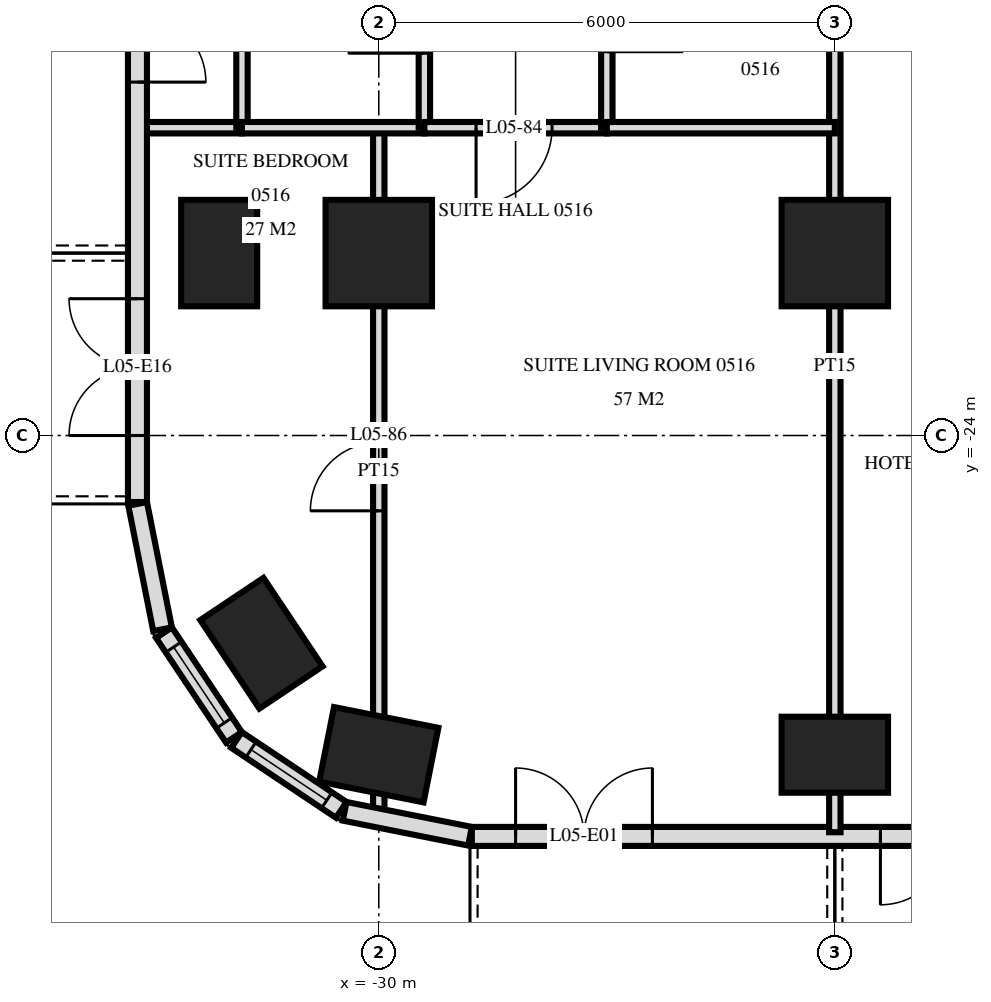
"""IFC4 building model, lengths in metres.
Left out: names, types, materials, properties, quantities, classifications, styles, units other than length and angle.
Written with IfcOpenShell. Run it as: python <this file> out.ifc"""

import sys

from ifc_helpers import new_model, si_unit, direction, frame, frame_2d, origin, origin_2d, place, context, subcontext, project, spatial, rectangle, extrude, element, fill, save


model = new_model("IFC4")
c1 = context("Model", 3, precision=1e-05, world=origin(), true_north=direction((0.0, 1.0)))
c2 = subcontext(c1, "Body", "Model", "MODEL_VIEW")
j1 = project(units=[si_unit("LENGTHUNIT", "METRE"), si_unit("PLANEANGLEUNIT", "RADIAN")], contexts=[c1])
p1 = place(None, origin())
s1 = spatial("IfcSite", under=j1, at=p1, CompositionType="ELEMENT")
p2 = place(p1, origin())
s2 = spatial("IfcBuilding", under=s1, at=p2, CompositionType="ELEMENT")
p3 = place(p2, frame((0.0, 0.0, 27.6)))
s3 = spatial("IfcBuildingStorey", under=s2, at=p3, CompositionType="ELEMENT", Elevation=27.6)
for number, where, z_axis, x_axis in (
    (1, (-32.1, -21.6, 0.0), (0.0, 0.0, 1.0), (0.0, 1.0, 0.0)),
    (2, (-31.544, -26.733, 0.0), (0.0, 0.0, 1.0), (-0.556, 0.831, 0.0)),
    (3, (-30.0, -28.2, 0.0), (0.0, 0.0, 1.0), (-0.981, 0.195, 0.0)),
):
    element("IfcColumn", number, at=place(p3, frame(where, z_axis=z_axis, x_axis=x_axis)), inside=s3, PredefinedType="COLUMN", context=c2, shape_type="SweptSolid", body=[
        extrude(rectangle(XDim=1.4, YDim=1.0, at=origin_2d()), origin(), (0.0, 0.0, 1.0), 3.6),
    ])
p4 = place(p3, frame((-30.0, -21.6, 0.0), z_axis=(0.0, 0.0, 1.0), x_axis=(1.0, 0.0, 0.0)))
e4 = element("IfcColumn", 4, at=p4, inside=s3, PredefinedType="COLUMN", context=c2, shape_type="SweptSolid", body=[
    extrude(rectangle(XDim=1.4, YDim=1.4, at=origin_2d()), origin(), (0.0, 0.0, 1.0), 3.6),
])
p5 = place(p3, frame((-24.0, -28.2, 0.0), z_axis=(0.0, 0.0, 1.0), x_axis=(1.0, 0.0, 0.0)))
e5 = element("IfcColumn", 5, at=p5, inside=s3, PredefinedType="COLUMN", context=c2, shape_type="SweptSolid", body=[
    extrude(rectangle(XDim=1.4, YDim=1.0, at=origin_2d()), origin(), (0.0, 0.0, 1.0), 3.6),
])
p6 = place(p3, frame((-24.0, -21.6, 0.0), z_axis=(0.0, 0.0, 1.0), x_axis=(1.0, 0.0, 0.0)))
e6 = element("IfcColumn", 6, at=p6, inside=s3, PredefinedType="COLUMN", context=c2, shape_type="SweptSolid", body=[
    extrude(rectangle(XDim=1.4, YDim=1.4, at=origin_2d()), origin(), (0.0, 0.0, 1.0), 3.6),
])
p7 = place(p3, frame((-33.175, -3.325, 0.0), z_axis=(0.0, 0.0, 1.0), x_axis=(0.0, -1.0, 0.0)))
e7 = element("IfcWall", 7, at=p7, inside=s3, PredefinedType="SOLIDWALL", context=c2, shape_type="SweptSolid", body=[
    extrude(rectangle(XDim=21.551, YDim=0.25, at=frame_2d((10.775, 0.0))), origin(), (0.0, 0.0, 1.0), 3.32),
])
p8 = place(p7, frame((7.025, 0.0, 0.0)))
e8 = element("IfcOpeningElement", 8, at=p8, cuts=e7, PredefinedType="OPENING", context=c2, shape_type="SweptSolid", body=[
    extrude(rectangle(XDim=1.8, YDim=2.4, at=frame_2d((0.9, 1.2))), frame((0.0, 0.135, 0.0), z_axis=(0.0, -1.0, 0.0), x_axis=(1.0, 0.0, 0.0)), (0.0, 0.0, 1.0), 0.27),
])
p9 = place(p7, frame((14.225, 0.0, 0.0)))
e9 = element("IfcOpeningElement", 9, at=p9, cuts=e7, PredefinedType="OPENING", context=c2, shape_type="SweptSolid", body=[
    extrude(rectangle(XDim=1.8, YDim=2.4, at=frame_2d((0.9, 1.2))), frame((0.0, 0.135, 0.0), z_axis=(0.0, -1.0, 0.0), x_axis=(1.0, 0.0, 0.0)), (0.0, 0.0, 1.0), 0.27),
])
p10 = place(p7, frame((18.875, 0.0, 0.0)))
e10 = element("IfcOpeningElement", 10, at=p10, cuts=e7, PredefinedType="OPENING", context=c2, shape_type="SweptSolid", body=[
    extrude(rectangle(XDim=1.8, YDim=2.4, at=frame_2d((0.9, 1.2))), frame((0.0, 0.135, 0.0), z_axis=(0.0, -1.0, 0.0), x_axis=(1.0, 0.0, 0.0)), (0.0, 0.0, 1.0), 0.27),
])
p11 = place(p3, frame((-33.173, -24.9, 0.0), z_axis=(0.0, 0.0, 1.0), x_axis=(0.195166572128, -0.980770110232, 0.0)))
e11 = element("IfcWall", 11, at=p11, inside=s3, PredefinedType="SOLIDWALL", context=c2, shape_type="SweptSolid", body=[
    extrude(rectangle(XDim=1.681, YDim=0.25, at=frame_2d((0.841, 0.0))), origin(), (0.0, 0.0, 1.0), 3.32),
])
p12 = place(p3, frame((-32.826, -26.594, 0.0), z_axis=(0.0, 0.0, 1.0), x_axis=(0.55555029066, -0.831482937015, 0.0)))
e12 = element("IfcWall", 12, at=p12, inside=s3, PredefinedType="SOLIDWALL", context=c2, shape_type="SweptSolid", body=[
    extrude(rectangle(XDim=1.656, YDim=0.25, at=frame_2d((0.828, 0.0))), origin(), (0.0, 0.0, 1.0), 3.32),
])
p13 = place(p12, frame((0.228, 0.0, 0.9)))
e13 = element("IfcOpeningElement", 13, at=p13, cuts=e12, PredefinedType="OPENING", context=c2, shape_type="SweptSolid", body=[
    extrude(rectangle(XDim=1.2, YDim=1.5, at=frame_2d((0.6, 0.75))), frame((0.0, 0.135, 0.0), z_axis=(0.0, -1.0, 0.0), x_axis=(1.0, 0.0, 0.0)), (0.0, 0.0, 1.0), 0.27),
])
p14 = place(p3, frame((-31.871, -28.006, 0.0), z_axis=(0.0, 0.0, 1.0), x_axis=(0.831482937015, -0.55555029066, 0.0)))
e14 = element("IfcWall", 14, at=p14, inside=s3, PredefinedType="SOLIDWALL", context=c2, shape_type="SweptSolid", body=[
    extrude(rectangle(XDim=1.656, YDim=0.25, at=frame_2d((0.828, 0.0))), origin(), (0.0, 0.0, 1.0), 3.32),
])
p15 = place(p14, frame((0.228, 0.0, 0.9)))
e15 = element("IfcOpeningElement", 15, at=p15, cuts=e14, PredefinedType="OPENING", context=c2, shape_type="SweptSolid", body=[
    extrude(rectangle(XDim=1.2, YDim=1.5, at=frame_2d((0.6, 0.75))), frame((0.0, 0.135, 0.0), z_axis=(0.0, -1.0, 0.0), x_axis=(1.0, 0.0, 0.0)), (0.0, 0.0, 1.0), 0.27),
])
p16 = place(p3, frame((-30.449, -28.945, 0.0), z_axis=(0.0, 0.0, 1.0), x_axis=(0.980775640221, -0.19513878023, 0.0)))
e16 = element("IfcWall", 16, at=p16, inside=s3, PredefinedType="SOLIDWALL", context=c2, shape_type="SweptSolid", body=[
    extrude(rectangle(XDim=1.681, YDim=0.25, at=frame_2d((0.841, 0.0))), origin(), (0.0, 0.0, 1.0), 3.32),
])
p17 = place(p3, frame((-28.775, -29.275, 0.0), z_axis=(0.0, 0.0, 1.0), x_axis=(1.0, 0.0, 0.0)))
e17 = element("IfcWall", 17, at=p17, inside=s3, PredefinedType="SOLIDWALL", context=c2, shape_type="SweptSolid", body=[
    extrude(rectangle(XDim=57.551, YDim=0.25, at=frame_2d((28.775, 0.0))), origin(), (0.0, 0.0, 1.0), 3.32),
])
p18 = place(p17, frame((0.575, 0.0, 0.0)))
e18 = element("IfcOpeningElement", 18, at=p18, cuts=e17, PredefinedType="OPENING", context=c2, shape_type="SweptSolid", body=[
    extrude(rectangle(XDim=1.8, YDim=2.4, at=frame_2d((0.9, 1.2))), frame((0.0, 0.135, 0.0), z_axis=(0.0, -1.0, 0.0), x_axis=(1.0, 0.0, 0.0)), (0.0, 0.0, 1.0), 0.27),
])
p19 = place(p17, frame((5.375, 0.0, 0.0)))
e19 = element("IfcOpeningElement", 19, at=p19, cuts=e17, PredefinedType="OPENING", context=c2, shape_type="SweptSolid", body=[
    extrude(rectangle(XDim=1.8, YDim=2.4, at=frame_2d((0.9, 1.2))), frame((0.0, 0.135, 0.0), z_axis=(0.0, -1.0, 0.0), x_axis=(1.0, 0.0, 0.0)), (0.0, 0.0, 1.0), 0.27),
])
p20 = place(p17, frame((8.075, 0.0, 0.3)))
e20 = element("IfcOpeningElement", 20, at=p20, cuts=e17, PredefinedType="OPENING", context=c2, shape_type="SweptSolid", body=[
    extrude(rectangle(XDim=2.4, YDim=2.1, at=frame_2d((1.2, 1.05))), frame((0.0, 0.135, 0.0), z_axis=(0.0, -1.0, 0.0), x_axis=(1.0, 0.0, 0.0)), (0.0, 0.0, 1.0), 0.27),
])
p21 = place(p17, frame((11.375, 0.0, 0.0)))
e21 = element("IfcOpeningElement", 21, at=p21, cuts=e17, PredefinedType="OPENING", context=c2, shape_type="SweptSolid", body=[
    extrude(rectangle(XDim=1.8, YDim=2.4, at=frame_2d((0.9, 1.2))), frame((0.0, 0.135, 0.0), z_axis=(0.0, -1.0, 0.0), x_axis=(1.0, 0.0, 0.0)), (0.0, 0.0, 1.0), 0.27),
])
p22 = place(p17, frame((14.075, 0.0, 0.3)))
e22 = element("IfcOpeningElement", 22, at=p22, cuts=e17, PredefinedType="OPENING", context=c2, shape_type="SweptSolid", body=[
    extrude(rectangle(XDim=2.4, YDim=2.1, at=frame_2d((1.2, 1.05))), frame((0.0, 0.135, 0.0), z_axis=(0.0, -1.0, 0.0), x_axis=(1.0, 0.0, 0.0)), (0.0, 0.0, 1.0), 0.27),
])
p23 = place(p17, frame((17.375, 0.0, 0.0)))
e23 = element("IfcOpeningElement", 23, at=p23, cuts=e17, PredefinedType="OPENING", context=c2, shape_type="SweptSolid", body=[
    extrude(rectangle(XDim=1.8, YDim=2.4, at=frame_2d((0.9, 1.2))), frame((0.0, 0.135, 0.0), z_axis=(0.0, -1.0, 0.0), x_axis=(1.0, 0.0, 0.0)), (0.0, 0.0, 1.0), 0.27),
])
p24 = place(p17, frame((20.075, 0.0, 0.3)))
e24 = element("IfcOpeningElement", 24, at=p24, cuts=e17, PredefinedType="OPENING", context=c2, shape_type="SweptSolid", body=[
    extrude(rectangle(XDim=2.4, YDim=2.1, at=frame_2d((1.2, 1.05))), frame((0.0, 0.135, 0.0), z_axis=(0.0, -1.0, 0.0), x_axis=(1.0, 0.0, 0.0)), (0.0, 0.0, 1.0), 0.27),
])
p25 = place(p17, frame((23.075, 0.0, 0.3)))
e25 = element("IfcOpeningElement", 25, at=p25, cuts=e17, PredefinedType="OPENING", context=c2, shape_type="SweptSolid", body=[
    extrude(rectangle(XDim=2.4, YDim=2.1, at=frame_2d((1.2, 1.05))), frame((0.0, 0.135, 0.0), z_axis=(0.0, -1.0, 0.0), x_axis=(1.0, 0.0, 0.0)), (0.0, 0.0, 1.0), 0.27),
])
p26 = place(p17, frame((26.375, 0.0, 0.0)))
e26 = element("IfcOpeningElement", 26, at=p26, cuts=e17, PredefinedType="OPENING", context=c2, shape_type="SweptSolid", body=[
    extrude(rectangle(XDim=1.8, YDim=2.4, at=frame_2d((0.9, 1.2))), frame((0.0, 0.135, 0.0), z_axis=(0.0, -1.0, 0.0), x_axis=(1.0, 0.0, 0.0)), (0.0, 0.0, 1.0), 0.27),
])
p27 = place(p17, frame((29.375, 0.0, 0.0)))
e27 = element("IfcOpeningElement", 27, at=p27, cuts=e17, PredefinedType="OPENING", context=c2, shape_type="SweptSolid", body=[
    extrude(rectangle(XDim=1.8, YDim=2.4, at=frame_2d((0.9, 1.2))), frame((0.0, 0.135, 0.0), z_axis=(0.0, -1.0, 0.0), x_axis=(1.0, 0.0, 0.0)), (0.0, 0.0, 1.0), 0.27),
])
p28 = place(p17, frame((32.075, 0.0, 0.3)))
e28 = element("IfcOpeningElement", 28, at=p28, cuts=e17, PredefinedType="OPENING", context=c2, shape_type="SweptSolid", body=[
    extrude(rectangle(XDim=2.4, YDim=2.1, at=frame_2d((1.2, 1.05))), frame((0.0, 0.135, 0.0), z_axis=(0.0, -1.0, 0.0), x_axis=(1.0, 0.0, 0.0)), (0.0, 0.0, 1.0), 0.27),
])
p29 = place(p17, frame((35.375, 0.0, 0.0)))
e29 = element("IfcOpeningElement", 29, at=p29, cuts=e17, PredefinedType="OPENING", context=c2, shape_type="SweptSolid", body=[
    extrude(rectangle(XDim=1.8, YDim=2.4, at=frame_2d((0.9, 1.2))), frame((0.0, 0.135, 0.0), z_axis=(0.0, -1.0, 0.0), x_axis=(1.0, 0.0, 0.0)), (0.0, 0.0, 1.0), 0.27),
])
p30 = place(p17, frame((38.075, 0.0, 0.3)))
e30 = element("IfcOpeningElement", 30, at=p30, cuts=e17, PredefinedType="OPENING", context=c2, shape_type="SweptSolid", body=[
    extrude(rectangle(XDim=2.4, YDim=2.1, at=frame_2d((1.2, 1.05))), frame((0.0, 0.135, 0.0), z_axis=(0.0, -1.0, 0.0), x_axis=(1.0, 0.0, 0.0)), (0.0, 0.0, 1.0), 0.27),
])
p31 = place(p17, frame((41.375, 0.0, 0.0)))
e31 = element("IfcOpeningElement", 31, at=p31, cuts=e17, PredefinedType="OPENING", context=c2, shape_type="SweptSolid", body=[
    extrude(rectangle(XDim=1.8, YDim=2.4, at=frame_2d((0.9, 1.2))), frame((0.0, 0.135, 0.0), z_axis=(0.0, -1.0, 0.0), x_axis=(1.0, 0.0, 0.0)), (0.0, 0.0, 1.0), 0.27),
])
p32 = place(p17, frame((44.075, 0.0, 0.3)))
e32 = element("IfcOpeningElement", 32, at=p32, cuts=e17, PredefinedType="OPENING", context=c2, shape_type="SweptSolid", body=[
    extrude(rectangle(XDim=2.4, YDim=2.1, at=frame_2d((1.2, 1.05))), frame((0.0, 0.135, 0.0), z_axis=(0.0, -1.0, 0.0), x_axis=(1.0, 0.0, 0.0)), (0.0, 0.0, 1.0), 0.27),
])
p33 = place(p17, frame((47.075, 0.0, 0.3)))
e33 = element("IfcOpeningElement", 33, at=p33, cuts=e17, PredefinedType="OPENING", context=c2, shape_type="SweptSolid", body=[
    extrude(rectangle(XDim=2.4, YDim=2.1, at=frame_2d((1.2, 1.05))), frame((0.0, 0.135, 0.0), z_axis=(0.0, -1.0, 0.0), x_axis=(1.0, 0.0, 0.0)), (0.0, 0.0, 1.0), 0.27),
])
p34 = place(p17, frame((50.375, 0.0, 0.0)))
e34 = element("IfcOpeningElement", 34, at=p34, cuts=e17, PredefinedType="OPENING", context=c2, shape_type="SweptSolid", body=[
    extrude(rectangle(XDim=1.8, YDim=2.4, at=frame_2d((0.9, 1.2))), frame((0.0, 0.135, 0.0), z_axis=(0.0, -1.0, 0.0), x_axis=(1.0, 0.0, 0.0)), (0.0, 0.0, 1.0), 0.27),
])
p35 = place(p17, frame((53.375, 0.0, 0.0)))
e35 = element("IfcOpeningElement", 35, at=p35, cuts=e17, PredefinedType="OPENING", context=c2, shape_type="SweptSolid", body=[
    extrude(rectangle(XDim=1.8, YDim=2.4, at=frame_2d((0.9, 1.2))), frame((0.0, 0.135, 0.0), z_axis=(0.0, -1.0, 0.0), x_axis=(1.0, 0.0, 0.0)), (0.0, 0.0, 1.0), 0.27),
])
p36 = place(p3, frame((-24.0, -29.22, 0.0), z_axis=(0.0, 0.0, 1.0), x_axis=(0.0, 1.0, 0.0)))
e36 = element("IfcWall", 36, at=p36, inside=s3, PredefinedType="PARTITIONING", context=c2, shape_type="SweptSolid", body=[
    extrude(rectangle(XDim=12.27, YDim=0.15, at=frame_2d((6.135, 0.0))), origin(), (0.0, 0.0, 1.0), 3.32),
])
p37 = place(p3, frame((-27.0, -19.95, 0.0), z_axis=(0.0, 0.0, 1.0), x_axis=(0.0, 1.0, 0.0)))
e37 = element("IfcWall", 37, at=p37, inside=s3, PredefinedType="PARTITIONING", context=c2, shape_type="SweptSolid", body=[
    extrude(rectangle(XDim=3.0, YDim=0.15, at=frame_2d((1.5, 0.0))), origin(), (0.0, 0.0, 1.0), 3.32),
])
p38 = place(p37, frame((1.0, 0.0, 0.0)))
e38 = element("IfcOpeningElement", 38, at=p38, cuts=e37, PredefinedType="OPENING", context=c2, shape_type="SweptSolid", body=[
    extrude(rectangle(XDim=1.0, YDim=2.1, at=frame_2d((0.5, 1.05))), frame((0.0, 0.085, 0.0), z_axis=(0.0, -1.0, 0.0), x_axis=(1.0, 0.0, 0.0)), (0.0, 0.0, 1.0), 0.17),
])
p39 = place(p3, frame((-29.4, -19.95, 0.0), z_axis=(0.0, 0.0, 1.0), x_axis=(0.0, 1.0, 0.0)))
e39 = element("IfcWall", 39, at=p39, inside=s3, PredefinedType="PARTITIONING", context=c2, shape_type="SweptSolid", body=[
    extrude(rectangle(XDim=3.0, YDim=0.15, at=frame_2d((1.5, 0.0))), origin(), (0.0, 0.0, 1.0), 3.32),
])
p40 = place(p39, frame((0.98, 0.0, 0.0)))
e40 = element("IfcOpeningElement", 40, at=p40, cuts=e39, PredefinedType="OPENING", context=c2, shape_type="SweptSolid", body=[
    extrude(rectangle(XDim=1.0, YDim=2.1, at=frame_2d((0.5, 1.05))), frame((0.0, 0.085, 0.0), z_axis=(0.0, -1.0, 0.0), x_axis=(1.0, 0.0, 0.0)), (0.0, 0.0, 1.0), 0.17),
])
p41 = place(p3, frame((-30.0, -28.978, 0.0), z_axis=(0.0, 0.0, 1.0), x_axis=(0.0, 1.0, 0.0)))
e41 = element("IfcWall", 41, at=p41, inside=s3, PredefinedType="PARTITIONING", context=c2, shape_type="SweptSolid", body=[
    extrude(rectangle(XDim=9.028, YDim=0.15, at=frame_2d((4.514, 0.0))), origin(), (0.0, 0.0, 1.0), 3.32),
])
p42 = place(p41, frame((3.987, 0.0, 0.0)))
e42 = element("IfcOpeningElement", 42, at=p42, cuts=e41, PredefinedType="OPENING", context=c2, shape_type="SweptSolid", body=[
    extrude(rectangle(XDim=0.9, YDim=2.1, at=frame_2d((0.45, 1.05))), frame((0.0, 0.085, 0.0), z_axis=(0.0, -1.0, 0.0), x_axis=(1.0, 0.0, 0.0)), (0.0, 0.0, 1.0), 0.17),
])
p43 = place(p3, frame((-31.8, -19.95, 0.0), z_axis=(0.0, 0.0, 1.0), x_axis=(0.0, 1.0, 0.0)))
e43 = element("IfcWall", 43, at=p43, inside=s3, PredefinedType="PLUMBINGWALL", context=c2, shape_type="SweptSolid", body=[
    extrude(rectangle(XDim=3.0, YDim=0.15, at=frame_2d((1.5, 0.0))), origin(), (0.0, 0.0, 1.0), 3.32),
])
p44 = place(p43, frame((1.08, 0.0, 0.0)))
e44 = element("IfcOpeningElement", 44, at=p44, cuts=e43, PredefinedType="OPENING", context=c2, shape_type="SweptSolid", body=[
    extrude(rectangle(XDim=0.8, YDim=2.1, at=frame_2d((0.4, 1.05))), frame((0.0, 0.085, 0.0), z_axis=(0.0, -1.0, 0.0), x_axis=(1.0, 0.0, 0.0)), (0.0, 0.0, 1.0), 0.17),
])
p45 = place(p3, frame((-29.4, -19.95, 0.0), z_axis=(0.0, 0.0, 1.0), x_axis=(1.0, 0.0, 0.0)))
e45 = element("IfcWall", 45, at=p45, inside=s3, PredefinedType="PARTITIONING", context=c2, shape_type="SweptSolid", body=[
    extrude(rectangle(XDim=2.4, YDim=0.15, at=frame_2d((1.2, 0.0))), origin(), (0.0, 0.0, 1.0), 3.32),
])
p46 = place(p45, frame((0.68, 0.0, 0.0)))
e46 = element("IfcOpeningElement", 46, at=p46, cuts=e45, PredefinedType="OPENING", context=c2, shape_type="SweptSolid", body=[
    extrude(rectangle(XDim=1.0, YDim=2.1, at=frame_2d((0.5, 1.05))), frame((0.0, 0.085, 0.0), z_axis=(0.0, -1.0, 0.0), x_axis=(1.0, 0.0, 0.0)), (0.0, 0.0, 1.0), 0.17),
])
p47 = place(p3, frame((-31.8, -19.95, 0.0), z_axis=(0.0, 0.0, 1.0), x_axis=(1.0, 0.0, 0.0)))
e47 = element("IfcWall", 47, at=p47, inside=s3, PredefinedType="PARTITIONING", context=c2, shape_type="SweptSolid", body=[
    extrude(rectangle(XDim=2.4, YDim=0.15, at=frame_2d((1.2, 0.0))), origin(), (0.0, 0.0, 1.0), 3.32),
])
p48 = place(p3, frame((-27.0, -19.95, 0.0), z_axis=(0.0, 0.0, 1.0), x_axis=(1.0, 0.0, 0.0)))
e48 = element("IfcWall", 48, at=p48, inside=s3, PredefinedType="PARTITIONING", context=c2, shape_type="SweptSolid", body=[
    extrude(rectangle(XDim=3.0, YDim=0.15, at=frame_2d((1.5, 0.0))), origin(), (0.0, 0.0, 1.0), 3.32),
])
p49 = place(p3, frame((-33.12, -19.95, 0.0), z_axis=(0.0, 0.0, 1.0), x_axis=(1.0, 0.0, 0.0)))
e49 = element("IfcWall", 49, at=p49, inside=s3, PredefinedType="PLUMBINGWALL", context=c2, shape_type="SweptSolid", body=[
    extrude(rectangle(XDim=1.32, YDim=0.15, at=frame_2d((0.66, 0.0))), origin(), (0.0, 0.0, 1.0), 3.32),
])
p50 = place(p13, origin())
e50 = element("IfcWindow", 50, at=p50, inside=s3, PartitioningType="SINGLE_PANEL", PredefinedType="WINDOW", context=c2, shape_type="SweptSolid", body=[
    extrude(rectangle(XDim=1.2, YDim=1.5, at=frame_2d((0.6, 0.75))), frame((0.0, 0.03, 0.0), z_axis=(0.0, -1.0, 0.0), x_axis=(1.0, 0.0, 0.0)), (0.0, 0.0, 1.0), 0.06),
])
fill(e13, e50)
p51 = place(p15, origin())
e51 = element("IfcWindow", 51, at=p51, inside=s3, PartitioningType="SINGLE_PANEL", PredefinedType="WINDOW", context=c2, shape_type="SweptSolid", body=[
    extrude(rectangle(XDim=1.2, YDim=1.5, at=frame_2d((0.6, 0.75))), frame((0.0, 0.03, 0.0), z_axis=(0.0, -1.0, 0.0), x_axis=(1.0, 0.0, 0.0)), (0.0, 0.0, 1.0), 0.06),
])
fill(e15, e51)
p52 = place(p18, origin())
e52 = element("IfcDoor", 52, at=p52, inside=s3, OperationType="DOUBLE_DOOR_SINGLE_SWING", PredefinedType="DOOR", context=c2, shape_type="SweptSolid", body=[
    extrude(rectangle(XDim=1.8, YDim=2.4, at=frame_2d((0.9, 1.2))), frame((0.0, 0.025, 0.0), z_axis=(0.0, -1.0, 0.0), x_axis=(1.0, 0.0, 0.0)), (0.0, 0.0, 1.0), 0.05),
])
fill(e18, e52)
p53 = place(p19, frame((0.9, 0.0, 0.0), z_axis=(0.0, 0.0, 1.0), x_axis=(-1.0, 0.0, 0.0)))
e53 = element("IfcDoor", 53, at=p53, inside=s3, OperationType="DOUBLE_DOOR_SINGLE_SWING", PredefinedType="DOOR", context=c2, shape_type="SweptSolid", body=[
    extrude(rectangle(XDim=1.8, YDim=2.4, at=frame_2d((0.0, 1.2))), frame((0.0, -0.025, 0.0), z_axis=(0.0, 1.0, 0.0), x_axis=(-1.0, 0.0, 0.0)), (0.0, 0.0, 1.0), 0.05),
])
fill(e19, e53)
p54 = place(p9, origin())
e54 = element("IfcDoor", 54, at=p54, inside=s3, OperationType="DOUBLE_DOOR_SINGLE_SWING", PredefinedType="DOOR", context=c2, shape_type="SweptSolid", body=[
    extrude(rectangle(XDim=1.8, YDim=2.4, at=frame_2d((0.9, 1.2))), frame((0.0, 0.025, 0.0), z_axis=(0.0, -1.0, 0.0), x_axis=(1.0, 0.0, 0.0)), (0.0, 0.0, 1.0), 0.05),
])
fill(e9, e54)
p55 = place(p10, frame((0.9, 0.0, 0.0), z_axis=(0.0, 0.0, 1.0), x_axis=(-1.0, 0.0, 0.0)))
e55 = element("IfcDoor", 55, at=p55, inside=s3, OperationType="DOUBLE_DOOR_SINGLE_SWING", PredefinedType="DOOR", context=c2, shape_type="SweptSolid", body=[
    extrude(rectangle(XDim=1.8, YDim=2.4, at=frame_2d((0.0, 1.2))), frame((0.0, -0.025, 0.0), z_axis=(0.0, 1.0, 0.0), x_axis=(-1.0, 0.0, 0.0)), (0.0, 0.0, 1.0), 0.05),
])
fill(e10, e55)
p56 = place(p40, origin())
e56 = element("IfcDoor", 56, at=p56, inside=s3, OperationType="SINGLE_SWING_RIGHT", PredefinedType="DOOR", context=c2, shape_type="SweptSolid", body=[
    extrude(rectangle(XDim=1.0, YDim=2.1, at=frame_2d((0.5, 1.05))), frame((0.0, 0.025, 0.0), z_axis=(0.0, -1.0, 0.0), x_axis=(1.0, 0.0, 0.0)), (0.0, 0.0, 1.0), 0.05),
])
fill(e40, e56)
p57 = place(p46, frame((0.5, 0.0, 0.0), z_axis=(0.0, 0.0, 1.0), x_axis=(-1.0, 0.0, 0.0)))
e57 = element("IfcDoor", 57, at=p57, inside=s3, OperationType="SINGLE_SWING_LEFT", PredefinedType="DOOR", context=c2, shape_type="SweptSolid", body=[
    extrude(rectangle(XDim=1.0, YDim=2.1, at=frame_2d((0.0, 1.05))), frame((0.0, -0.025, 0.0), z_axis=(0.0, 1.0, 0.0), x_axis=(-1.0, 0.0, 0.0)), (0.0, 0.0, 1.0), 0.05),
])
fill(e46, e57)
p58 = place(p42, origin())
e58 = element("IfcDoor", 58, at=p58, inside=s3, OperationType="SINGLE_SWING_RIGHT", PredefinedType="DOOR", context=c2, shape_type="SweptSolid", body=[
    extrude(rectangle(XDim=0.9, YDim=2.1, at=frame_2d((0.45, 1.05))), frame((0.0, 0.025, 0.0), z_axis=(0.0, -1.0, 0.0), x_axis=(1.0, 0.0, 0.0)), (0.0, 0.0, 1.0), 0.05),
])
fill(e42, e58)
save(model, sys.argv[1])
